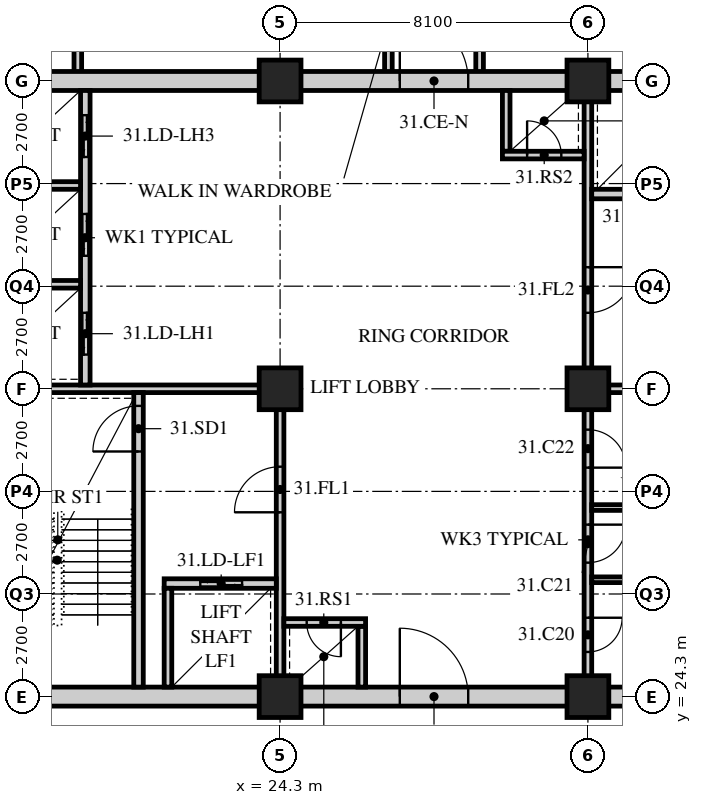
"""IFC4 building model, lengths in metres.
Left out: names, types, materials, properties, quantities, classifications, styles, units other than length and angle.
Written with IfcOpenShell. Run it as: python <this file> out.ifc"""

import sys

from ifc_helpers import new_model, si_unit, direction, frame, frame_2d, origin, origin_2d, place, context, subcontext, project, spatial, rectangle, hollow_rectangle, extrude, element, fill, save


model = new_model("IFC4")
c1 = context("Model", 3, precision=1e-05, world=origin(), true_north=direction((0.0, 1.0)))
c2 = subcontext(c1, "Body", "Model", "MODEL_VIEW")
j1 = project(units=[si_unit("LENGTHUNIT", "METRE"), si_unit("PLANEANGLEUNIT", "RADIAN")], contexts=[c1])
p1 = place(None, origin())
s1 = spatial("IfcSite", under=j1, at=p1, CompositionType="ELEMENT")
p2 = place(p1, origin())
s2 = spatial("IfcBuilding", under=s1, at=p2, CompositionType="ELEMENT")
p3 = place(p2, frame((0.0, 0.0, 123.8)))
s3 = spatial("IfcBuildingStorey", under=s2, at=p3, CompositionType="ELEMENT", Elevation=123.8)
for number, where, z_axis, x_axis in (
    (1, (24.3, 24.3, 0.0), (0.0, 0.0, 1.0), (1.0, 0.0, 0.0)),
    (2, (24.3, 32.4, 0.0), (0.0, 0.0, 1.0), (1.0, 0.0, 0.0)),
    (3, (24.3, 40.5, 0.0), (0.0, 0.0, 1.0), (1.0, 0.0, 0.0)),
    (4, (32.4, 24.3, 0.0), (0.0, 0.0, 1.0), (1.0, 0.0, 0.0)),
    (5, (32.4, 32.4, 0.0), (0.0, 0.0, 1.0), (1.0, 0.0, 0.0)),
    (6, (32.4, 40.5, 0.0), (0.0, 0.0, 1.0), (1.0, 0.0, 0.0)),
):
    element("IfcColumn", number, at=place(p3, frame(where, z_axis=z_axis, x_axis=x_axis)), inside=s3, PredefinedType="COLUMN", context=c2, shape_type="SweptSolid", body=[
        extrude(hollow_rectangle(XDim=1.1, YDim=1.1, WallThickness=0.1, at=origin_2d()), origin(), (0.0, 0.0, 1.0), 3.4),
    ])
for number, where, z_axis, x_axis in (
    (7, (18.978, 44.1, 0.0), (0.0, 0.0, 1.0), (0.0, -1.0, 0.0)),
    (8, (27.15, 40.5, 0.0), (0.0, 0.0, 1.0), (0.0, 1.0, 0.0)),
    (9, (29.55, 40.5, 0.0), (0.0, 0.0, 1.0), (0.0, 1.0, 0.0)),
):
    element("IfcWall", number, at=place(p3, frame(where, z_axis=z_axis, x_axis=x_axis)), inside=s3, PredefinedType="SOLIDWALL", context=c2, shape_type="SweptSolid", body=[
        extrude(rectangle(XDim=3.6, YDim=0.2, at=frame_2d((1.8, 0.0))), origin(), (0.0, 0.0, 1.0), 3.19),
    ])
p4 = place(p3, frame((15.95, 24.3, 0.0), z_axis=(0.0, 0.0, 1.0), x_axis=(1.0, 0.0, 0.0)))
e10 = element("IfcWall", 10, at=p4, inside=s3, PredefinedType="SOLIDWALL", context=c2, shape_type="SweptSolid", body=[
    extrude(rectangle(XDim=24.8, YDim=0.5, at=frame_2d((12.4, 0.0))), origin(), (0.0, 0.0, 1.0), 2.54),
])
p5 = place(p4, frame((11.5, 0.0, 0.0)))
e11 = element("IfcOpeningElement", 11, at=p5, cuts=e10, PredefinedType="OPENING", context=c2, shape_type="SweptSolid", body=[
    extrude(rectangle(XDim=1.8, YDim=2.4, at=frame_2d((0.9, 1.2))), frame((0.0, 0.26, 0.0), z_axis=(0.0, -1.0, 0.0), x_axis=(1.0, 0.0, 0.0)), (0.0, 0.0, 1.0), 0.52),
])
p6 = place(p3, frame((15.95, 40.5, 0.0), z_axis=(0.0, 0.0, 1.0), x_axis=(1.0, 0.0, 0.0)))
e12 = element("IfcWall", 12, at=p6, inside=s3, PredefinedType="SOLIDWALL", context=c2, shape_type="SweptSolid", body=[
    extrude(rectangle(XDim=24.8, YDim=0.5, at=frame_2d((12.4, 0.0))), origin(), (0.0, 0.0, 1.0), 2.54),
])
p7 = place(p6, frame((11.5, 0.0, 0.0)))
e13 = element("IfcOpeningElement", 13, at=p7, cuts=e12, PredefinedType="OPENING", context=c2, shape_type="SweptSolid", body=[
    extrude(rectangle(XDim=1.8, YDim=2.4, at=frame_2d((0.9, 1.2))), frame((0.0, 0.26, 0.0), z_axis=(0.0, -1.0, 0.0), x_axis=(1.0, 0.0, 0.0)), (0.0, 0.0, 1.0), 0.52),
])
p8 = place(p3, frame((16.45, 32.4, 0.0), z_axis=(0.0, 0.0, 1.0), x_axis=(1.0, 0.0, 0.0)))
e14 = element("IfcWall", 14, at=p8, inside=s3, PredefinedType="SOLIDWALL", context=c2, shape_type="SweptSolid", body=[
    extrude(rectangle(XDim=7.95, YDim=0.2, at=frame_2d((3.975, 0.0))), origin(), (0.0, 0.0, 1.0), 2.578),
])
p9 = place(p3, frame((24.3, 24.55, 0.0), z_axis=(0.0, 0.0, 1.0), x_axis=(0.0, 1.0, 0.0)))
e15 = element("IfcWall", 15, at=p9, inside=s3, PredefinedType="SOLIDWALL", context=c2, shape_type="SweptSolid", body=[
    extrude(rectangle(XDim=7.75, YDim=0.2, at=frame_2d((3.875, 0.0))), origin(), (0.0, 0.0, 1.0), 2.578),
])
p10 = place(p9, frame((4.6, 0.0, 0.0)))
e16 = element("IfcOpeningElement", 16, at=p10, cuts=e15, PredefinedType="OPENING", context=c2, shape_type="SweptSolid", body=[
    extrude(rectangle(XDim=1.2, YDim=2.1, at=frame_2d((0.6, 1.05))), frame((0.0, 0.11, 0.0), z_axis=(0.0, -1.0, 0.0), x_axis=(1.0, 0.0, 0.0)), (0.0, 0.0, 1.0), 0.22),
])
p11 = place(p3, frame((20.575, 24.55, 0.0), z_axis=(0.0, 0.0, 1.0), x_axis=(0.0, 1.0, 0.0)))
e17 = element("IfcWall", 17, at=p11, inside=s3, PredefinedType="SOLIDWALL", context=c2, shape_type="SweptSolid", body=[
    extrude(rectangle(XDim=7.75, YDim=0.25, at=frame_2d((3.875, 0.0))), origin(), (0.0, 0.0, 1.0), 3.19),
])
p12 = place(p11, frame((6.2, 0.0, 0.0)))
e18 = element("IfcOpeningElement", 18, at=p12, cuts=e17, PredefinedType="OPENING", context=c2, shape_type="SweptSolid", body=[
    extrude(rectangle(XDim=1.2, YDim=2.1, at=frame_2d((0.6, 1.05))), frame((0.0, 0.135, 0.0), z_axis=(0.0, -1.0, 0.0), x_axis=(1.0, 0.0, 0.0)), (0.0, 0.0, 1.0), 0.27),
])
p13 = place(p3, frame((21.25, 27.275, 0.0), z_axis=(0.0, 0.0, 1.0), x_axis=(1.0, 0.0, 0.0)))
e19 = element("IfcWall", 19, at=p13, inside=s3, PredefinedType="SOLIDWALL", context=c2, shape_type="SweptSolid", body=[
    extrude(rectangle(XDim=2.95, YDim=0.25, at=frame_2d((1.475, 0.0))), origin(), (0.0, 0.0, 1.0), 3.19),
])
p14 = place(p13, frame((0.95, 0.0, 0.0)))
e20 = element("IfcOpeningElement", 20, at=p14, cuts=e19, PredefinedType="OPENING", context=c2, shape_type="SweptSolid", body=[
    extrude(rectangle(XDim=1.1, YDim=2.4, at=frame_2d((0.55, 1.2))), frame((0.0, 0.135, 0.0), z_axis=(0.0, -1.0, 0.0), x_axis=(1.0, 0.0, 0.0)), (0.0, 0.0, 1.0), 0.27),
])
p15 = place(p3, frame((21.35, 24.55, 0.0), z_axis=(0.0, 0.0, 1.0), x_axis=(0.0, 1.0, 0.0)))
e21 = element("IfcWall", 21, at=p15, inside=s3, PredefinedType="SOLIDWALL", context=c2, shape_type="SweptSolid", body=[
    extrude(rectangle(XDim=2.6, YDim=0.2, at=frame_2d((1.3, 0.0))), origin(), (0.0, 0.0, 1.0), 3.19),
])
p16 = place(p3, frame((19.175, 32.5, 0.0), z_axis=(0.0, 0.0, 1.0), x_axis=(0.0, 1.0, 0.0)))
e22 = element("IfcWall", 22, at=p16, inside=s3, PredefinedType="SOLIDWALL", context=c2, shape_type="SweptSolid", body=[
    extrude(rectangle(XDim=7.75, YDim=0.25, at=frame_2d((3.875, 0.0))), origin(), (0.0, 0.0, 1.0), 3.19),
])
p17 = place(p16, frame((0.8, 0.0, 0.0)))
e23 = element("IfcOpeningElement", 23, at=p17, cuts=e22, PredefinedType="OPENING", context=c2, shape_type="SweptSolid", body=[
    extrude(rectangle(XDim=1.1, YDim=2.4, at=frame_2d((0.55, 1.2))), frame((0.0, 0.135, 0.0), z_axis=(0.0, -1.0, 0.0), x_axis=(1.0, 0.0, 0.0)), (0.0, 0.0, 1.0), 0.27),
])
p18 = place(p16, frame((3.4, 0.0, 0.0)))
e24 = element("IfcOpeningElement", 24, at=p18, cuts=e22, PredefinedType="OPENING", context=c2, shape_type="SweptSolid", body=[
    extrude(rectangle(XDim=1.1, YDim=2.4, at=frame_2d((0.55, 1.2))), frame((0.0, 0.135, 0.0), z_axis=(0.0, -1.0, 0.0), x_axis=(1.0, 0.0, 0.0)), (0.0, 0.0, 1.0), 0.27),
])
p19 = place(p16, frame((6.0, 0.0, 0.0)))
e25 = element("IfcOpeningElement", 25, at=p19, cuts=e22, PredefinedType="OPENING", context=c2, shape_type="SweptSolid", body=[
    extrude(rectangle(XDim=1.1, YDim=2.4, at=frame_2d((0.55, 1.2))), frame((0.0, 0.135, 0.0), z_axis=(0.0, -1.0, 0.0), x_axis=(1.0, 0.0, 0.0)), (0.0, 0.0, 1.0), 0.27),
])
for number, where, z_axis, x_axis in (
    (26, (16.45, 35.15, 0.0), (0.0, 0.0, 1.0), (1.0, 0.0, 0.0)),
    (27, (16.45, 37.75, 0.0), (0.0, 0.0, 1.0), (1.0, 0.0, 0.0)),
):
    element("IfcWall", number, at=place(p3, frame(where, z_axis=z_axis, x_axis=x_axis)), inside=s3, PredefinedType="SOLIDWALL", context=c2, shape_type="SweptSolid", body=[
        extrude(rectangle(XDim=2.6, YDim=0.2, at=frame_2d((1.3, 0.0))), origin(), (0.0, 0.0, 1.0), 3.19),
    ])
p20 = place(p3, frame((26.45, 24.55, 0.0), z_axis=(0.0, 0.0, 1.0), x_axis=(0.0, 1.0, 0.0)))
e28 = element("IfcWall", 28, at=p20, inside=s3, PredefinedType="SOLIDWALL", context=c2, shape_type="SweptSolid", body=[
    extrude(rectangle(XDim=1.6, YDim=0.2, at=frame_2d((0.8, 0.0))), origin(), (0.0, 0.0, 1.0), 3.19),
])
p21 = place(p3, frame((24.4, 26.25, 0.0), z_axis=(0.0, 0.0, 1.0), x_axis=(1.0, 0.0, 0.0)))
e29 = element("IfcWall", 29, at=p21, inside=s3, PredefinedType="SOLIDWALL", context=c2, shape_type="SweptSolid", body=[
    extrude(rectangle(XDim=2.15, YDim=0.2, at=frame_2d((1.075, 0.0))), origin(), (0.0, 0.0, 1.0), 3.19),
])
p22 = place(p21, frame((0.6, 0.0, 0.0)))
e30 = element("IfcOpeningElement", 30, at=p22, cuts=e29, PredefinedType="OPENING", context=c2, shape_type="SweptSolid", body=[
    extrude(rectangle(XDim=0.9, YDim=2.1, at=frame_2d((0.45, 1.05))), frame((0.0, 0.11, 0.0), z_axis=(0.0, -1.0, 0.0), x_axis=(1.0, 0.0, 0.0)), (0.0, 0.0, 1.0), 0.22),
])
p23 = place(p3, frame((32.3, 32.4, 0.0), z_axis=(0.0, 0.0, 1.0), x_axis=(1.0, 0.0, 0.0)))
e31 = element("IfcWall", 31, at=p23, inside=s3, PredefinedType="SOLIDWALL", context=c2, shape_type="SweptSolid", body=[
    extrude(rectangle(XDim=7.95, YDim=0.2, at=frame_2d((3.975, 0.0))), origin(), (0.0, 0.0, 1.0), 2.578),
])
p24 = place(p3, frame((32.4, 32.5, 0.0), z_axis=(0.0, 0.0, 1.0), x_axis=(0.0, 1.0, 0.0)))
e32 = element("IfcWall", 32, at=p24, inside=s3, PredefinedType="SOLIDWALL", context=c2, shape_type="SweptSolid", body=[
    extrude(rectangle(XDim=7.75, YDim=0.2, at=frame_2d((3.875, 0.0))), origin(), (0.0, 0.0, 1.0), 2.578),
])
p25 = place(p24, frame((1.9, 0.0, 0.0)))
e33 = element("IfcOpeningElement", 33, at=p25, cuts=e32, PredefinedType="OPENING", context=c2, shape_type="SweptSolid", body=[
    extrude(rectangle(XDim=1.2, YDim=2.1, at=frame_2d((0.6, 1.05))), frame((0.0, 0.11, 0.0), z_axis=(0.0, -1.0, 0.0), x_axis=(1.0, 0.0, 0.0)), (0.0, 0.0, 1.0), 0.22),
])
p26 = place(p3, frame((32.5, 37.525, 0.0), z_axis=(0.0, 0.0, 1.0), x_axis=(1.0, 0.0, 0.0)))
e34 = element("IfcWall", 34, at=p26, inside=s3, PredefinedType="SOLIDWALL", context=c2, shape_type="SweptSolid", body=[
    extrude(rectangle(XDim=2.95, YDim=0.25, at=frame_2d((1.475, 0.0))), origin(), (0.0, 0.0, 1.0), 3.19),
])
p27 = place(p26, frame((0.9, 0.0, 0.0)))
e35 = element("IfcOpeningElement", 35, at=p27, cuts=e34, PredefinedType="OPENING", context=c2, shape_type="SweptSolid", body=[
    extrude(rectangle(XDim=1.1, YDim=2.4, at=frame_2d((0.55, 1.2))), frame((0.0, 0.135, 0.0), z_axis=(0.0, -1.0, 0.0), x_axis=(1.0, 0.0, 0.0)), (0.0, 0.0, 1.0), 0.27),
])
p28 = place(p3, frame((30.25, 38.65, 0.0), z_axis=(0.0, 0.0, 1.0), x_axis=(0.0, 1.0, 0.0)))
e36 = element("IfcWall", 36, at=p28, inside=s3, PredefinedType="SOLIDWALL", context=c2, shape_type="SweptSolid", body=[
    extrude(rectangle(XDim=1.6, YDim=0.2, at=frame_2d((0.8, 0.0))), origin(), (0.0, 0.0, 1.0), 3.19),
])
p29 = place(p3, frame((30.15, 38.55, 0.0), z_axis=(0.0, 0.0, 1.0), x_axis=(1.0, 0.0, 0.0)))
e37 = element("IfcWall", 37, at=p29, inside=s3, PredefinedType="SOLIDWALL", context=c2, shape_type="SweptSolid", body=[
    extrude(rectangle(XDim=2.15, YDim=0.2, at=frame_2d((1.075, 0.0))), origin(), (0.0, 0.0, 1.0), 3.19),
])
p30 = place(p29, frame((0.65, 0.0, 0.0)))
e38 = element("IfcOpeningElement", 38, at=p30, cuts=e37, PredefinedType="OPENING", context=c2, shape_type="SweptSolid", body=[
    extrude(rectangle(XDim=0.9, YDim=2.1, at=frame_2d((0.45, 1.05))), frame((0.0, 0.11, 0.0), z_axis=(0.0, -1.0, 0.0), x_axis=(1.0, 0.0, 0.0)), (0.0, 0.0, 1.0), 0.22),
])
p31 = place(p3, frame((32.4, 24.55, 0.0), z_axis=(0.0, 0.0, 1.0), x_axis=(0.0, 1.0, 0.0)))
e39 = element("IfcWall", 39, at=p31, inside=s3, PredefinedType="PARTITIONING", context=c2, shape_type="SweptSolid", body=[
    extrude(rectangle(XDim=7.75, YDim=0.2, at=frame_2d((3.875, 0.0))), origin(), (0.0, 0.0, 1.0), 2.578),
])
p32 = place(p31, frame((0.925, 0.0, 0.0)))
e40 = element("IfcOpeningElement", 40, at=p32, cuts=e39, PredefinedType="OPENING", context=c2, shape_type="SweptSolid", body=[
    extrude(rectangle(XDim=0.9, YDim=2.1, at=frame_2d((0.45, 1.05))), frame((0.0, 0.11, 0.0), z_axis=(0.0, -1.0, 0.0), x_axis=(1.0, 0.0, 0.0)), (0.0, 0.0, 1.0), 0.22),
])
p33 = place(p31, frame((3.275, 0.0, 0.0)))
e41 = element("IfcOpeningElement", 41, at=p33, cuts=e39, PredefinedType="OPENING", context=c2, shape_type="SweptSolid", body=[
    extrude(rectangle(XDim=1.0, YDim=2.1, at=frame_2d((0.5, 1.05))), frame((0.0, 0.11, 0.0), z_axis=(0.0, -1.0, 0.0), x_axis=(1.0, 0.0, 0.0)), (0.0, 0.0, 1.0), 0.22),
])
p34 = place(p31, frame((5.775, 0.0, 0.0)))
e42 = element("IfcOpeningElement", 42, at=p34, cuts=e39, PredefinedType="OPENING", context=c2, shape_type="SweptSolid", body=[
    extrude(rectangle(XDim=1.0, YDim=2.1, at=frame_2d((0.5, 1.05))), frame((0.0, 0.11, 0.0), z_axis=(0.0, -1.0, 0.0), x_axis=(1.0, 0.0, 0.0)), (0.0, 0.0, 1.0), 0.22),
])
p35 = place(p3, frame((32.5, 27.375, 0.0), z_axis=(0.0, 0.0, 1.0), x_axis=(1.0, 0.0, 0.0)))
e43 = element("IfcWall", 43, at=p35, inside=s3, PredefinedType="PARTITIONING", context=c2, shape_type="SweptSolid", body=[
    extrude(rectangle(XDim=2.15, YDim=0.15, at=frame_2d((1.075, 0.0))), origin(), (0.0, 0.0, 1.0), 3.19),
])
p36 = place(p3, frame((32.5, 29.275, 0.0), z_axis=(0.0, 0.0, 1.0), x_axis=(1.0, 0.0, 0.0)))
e44 = element("IfcWall", 44, at=p36, inside=s3, PredefinedType="PARTITIONING", context=c2, shape_type="SweptSolid", body=[
    extrude(rectangle(XDim=4.9, YDim=0.15, at=frame_2d((2.45, 0.0))), origin(), (0.0, 0.0, 1.0), 3.19),
])
p37 = place(p32, origin())
e45 = element("IfcDoor", 45, at=p37, inside=s3, OperationType="SINGLE_SWING_LEFT", PredefinedType="DOOR", context=c2, shape_type="SweptSolid", body=[
    extrude(rectangle(XDim=0.9, YDim=2.1, at=frame_2d((0.45, 1.05))), frame((0.0, 0.025, 0.0), z_axis=(0.0, -1.0, 0.0), x_axis=(1.0, 0.0, 0.0)), (0.0, 0.0, 1.0), 0.05),
])
fill(e40, e45)
p38 = place(p33, origin())
e46 = element("IfcDoor", 46, at=p38, inside=s3, OperationType="SINGLE_SWING_LEFT", PredefinedType="DOOR", context=c2, shape_type="SweptSolid", body=[
    extrude(rectangle(XDim=1.0, YDim=2.1, at=frame_2d((0.5, 1.05))), frame((0.0, 0.025, 0.0), z_axis=(0.0, -1.0, 0.0), x_axis=(1.0, 0.0, 0.0)), (0.0, 0.0, 1.0), 0.05),
])
fill(e41, e46)
p39 = place(p34, origin())
e47 = element("IfcDoor", 47, at=p39, inside=s3, OperationType="SINGLE_SWING_RIGHT", PredefinedType="DOOR", context=c2, shape_type="SweptSolid", body=[
    extrude(rectangle(XDim=1.0, YDim=2.1, at=frame_2d((0.5, 1.05))), frame((0.0, 0.025, 0.0), z_axis=(0.0, -1.0, 0.0), x_axis=(1.0, 0.0, 0.0)), (0.0, 0.0, 1.0), 0.05),
])
fill(e42, e47)
p40 = place(p12, origin())
e48 = element("IfcDoor", 48, at=p40, inside=s3, OperationType="SINGLE_SWING_LEFT", PredefinedType="DOOR", context=c2, shape_type="SweptSolid", body=[
    extrude(rectangle(XDim=1.2, YDim=2.1, at=frame_2d((0.6, 1.05))), frame((0.0, 0.025, 0.0), z_axis=(0.0, -1.0, 0.0), x_axis=(1.0, 0.0, 0.0)), (0.0, 0.0, 1.0), 0.05),
])
fill(e18, e48)
p41 = place(p10, origin())
e49 = element("IfcDoor", 49, at=p41, inside=s3, OperationType="SINGLE_SWING_LEFT", PredefinedType="DOOR", context=c2, shape_type="SweptSolid", body=[
    extrude(rectangle(XDim=1.2, YDim=2.1, at=frame_2d((0.6, 1.05))), frame((0.0, 0.025, 0.0), z_axis=(0.0, -1.0, 0.0), x_axis=(1.0, 0.0, 0.0)), (0.0, 0.0, 1.0), 0.05),
])
fill(e16, e49)
p42 = place(p22, origin())
e50 = element("IfcDoor", 50, at=p42, inside=s3, OperationType="SINGLE_SWING_LEFT", PredefinedType="DOOR", context=c2, shape_type="SweptSolid", body=[
    extrude(rectangle(XDim=0.9, YDim=2.1, at=frame_2d((0.45, 1.05))), frame((0.0, 0.025, 0.0), z_axis=(0.0, -1.0, 0.0), x_axis=(1.0, 0.0, 0.0)), (0.0, 0.0, 1.0), 0.05),
])
fill(e30, e50)
p43 = place(p25, origin())
e51 = element("IfcDoor", 51, at=p43, inside=s3, OperationType="SINGLE_SWING_LEFT", PredefinedType="DOOR", context=c2, shape_type="SweptSolid", body=[
    extrude(rectangle(XDim=1.2, YDim=2.1, at=frame_2d((0.6, 1.05))), frame((0.0, 0.025, 0.0), z_axis=(0.0, -1.0, 0.0), x_axis=(1.0, 0.0, 0.0)), (0.0, 0.0, 1.0), 0.05),
])
fill(e33, e51)
p44 = place(p30, origin())
e52 = element("IfcDoor", 52, at=p44, inside=s3, OperationType="SINGLE_SWING_LEFT", PredefinedType="DOOR", context=c2, shape_type="SweptSolid", body=[
    extrude(rectangle(XDim=0.9, YDim=2.1, at=frame_2d((0.45, 1.05))), frame((0.0, 0.025, 0.0), z_axis=(0.0, -1.0, 0.0), x_axis=(1.0, 0.0, 0.0)), (0.0, 0.0, 1.0), 0.05),
])
fill(e38, e52)
p45 = place(p17, origin())
e53 = element("IfcDoor", 53, at=p45, inside=s3, OperationType="DOUBLE_DOOR_SLIDING", PredefinedType="DOOR", context=c2, shape_type="SweptSolid", body=[
    extrude(rectangle(XDim=1.1, YDim=2.4, at=frame_2d((0.55, 1.2))), frame((0.0, 0.025, 0.0), z_axis=(0.0, -1.0, 0.0), x_axis=(1.0, 0.0, 0.0)), (0.0, 0.0, 1.0), 0.05),
])
fill(e23, e53)
p46 = place(p18, origin())
e54 = element("IfcDoor", 54, at=p46, inside=s3, OperationType="DOUBLE_DOOR_SLIDING", PredefinedType="DOOR", context=c2, shape_type="SweptSolid", body=[
    extrude(rectangle(XDim=1.1, YDim=2.4, at=frame_2d((0.55, 1.2))), frame((0.0, 0.025, 0.0), z_axis=(0.0, -1.0, 0.0), x_axis=(1.0, 0.0, 0.0)), (0.0, 0.0, 1.0), 0.05),
])
fill(e24, e54)
p47 = place(p19, origin())
e55 = element("IfcDoor", 55, at=p47, inside=s3, OperationType="DOUBLE_DOOR_SLIDING", PredefinedType="DOOR", context=c2, shape_type="SweptSolid", body=[
    extrude(rectangle(XDim=1.1, YDim=2.4, at=frame_2d((0.55, 1.2))), frame((0.0, 0.025, 0.0), z_axis=(0.0, -1.0, 0.0), x_axis=(1.0, 0.0, 0.0)), (0.0, 0.0, 1.0), 0.05),
])
fill(e25, e55)
p48 = place(p14, origin())
e56 = element("IfcDoor", 56, at=p48, inside=s3, OperationType="DOUBLE_DOOR_SLIDING", PredefinedType="DOOR", context=c2, shape_type="SweptSolid", body=[
    extrude(rectangle(XDim=1.1, YDim=2.4, at=frame_2d((0.55, 1.2))), frame((0.0, 0.025, 0.0), z_axis=(0.0, -1.0, 0.0), x_axis=(1.0, 0.0, 0.0)), (0.0, 0.0, 1.0), 0.05),
])
fill(e20, e56)
p49 = place(p5, origin())
e57 = element("IfcDoor", 57, at=p49, inside=s3, OperationType="DOUBLE_DOOR_SINGLE_SWING", PredefinedType="DOOR", context=c2, shape_type="SweptSolid", body=[
    extrude(rectangle(XDim=1.8, YDim=2.4, at=frame_2d((0.9, 1.2))), frame((0.0, 0.025, 0.0), z_axis=(0.0, -1.0, 0.0), x_axis=(1.0, 0.0, 0.0)), (0.0, 0.0, 1.0), 0.05),
])
fill(e11, e57)
p50 = place(p7, origin())
e58 = element("IfcDoor", 58, at=p50, inside=s3, OperationType="DOUBLE_DOOR_SINGLE_SWING", PredefinedType="DOOR", context=c2, shape_type="SweptSolid", body=[
    extrude(rectangle(XDim=1.8, YDim=2.4, at=frame_2d((0.9, 1.2))), frame((0.0, 0.025, 0.0), z_axis=(0.0, -1.0, 0.0), x_axis=(1.0, 0.0, 0.0)), (0.0, 0.0, 1.0), 0.05),
])
fill(e13, e58)
save(model, sys.argv[1])
